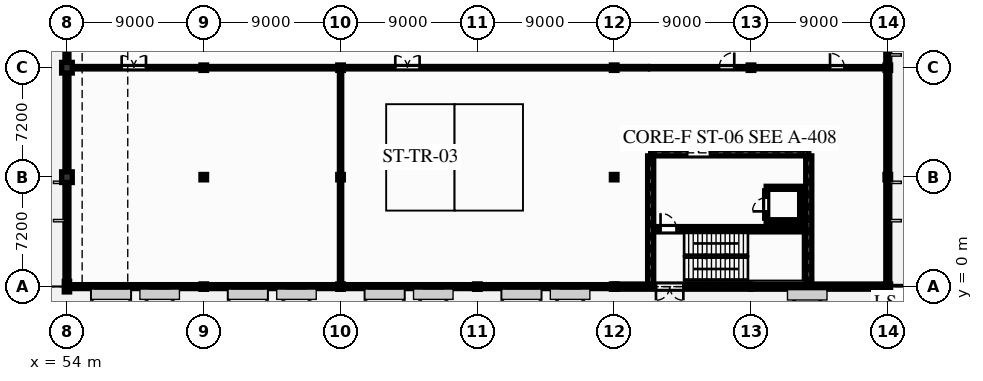
"""IFC4 building model, lengths in metres.
Left out: names, types, materials, properties, quantities, classifications, styles, units other than length and angle.
Written with IfcOpenShell. Run it as: python <this file> out.ifc"""

import sys

from ifc_helpers import new_model, si_unit, direction, frame, frame_2d, origin, origin_2d, place, context, subcontext, project, spatial, rectangle, i_section, extrude, element, fill, save


model = new_model("IFC4")
c1 = context("Model", 3, precision=1e-05, world=origin(), true_north=direction((0.0, 1.0)))
c2 = subcontext(c1, "Body", "Model", "MODEL_VIEW")
j1 = project(units=[si_unit("LENGTHUNIT", "METRE"), si_unit("PLANEANGLEUNIT", "RADIAN")], contexts=[c1])
p1 = place(None, origin())
s1 = spatial("IfcSite", under=j1, at=p1, CompositionType="ELEMENT")
p2 = place(p1, origin())
s2 = spatial("IfcBuilding", under=s1, at=p2, CompositionType="ELEMENT")
p3 = place(p2, origin())
s3 = spatial("IfcBuildingStorey", under=s2, at=p3, CompositionType="ELEMENT", Elevation=0.0)
p4 = place(p3, frame((54.0, 0.0, 0.0), z_axis=(0.0, 0.0, 1.0), x_axis=(0.0, 1.0, 0.0)))
e1 = element("IfcColumn", 1, at=p4, inside=s3, PredefinedType="PILASTER", context=c2, shape_type="SweptSolid", body=[
    extrude(rectangle(XDim=0.35, YDim=0.7, at=origin_2d()), origin(), (0.0, 0.0, 1.0), 5.1),
])
for number, where, z_axis, x_axis in (
    (2, (54.0, 7.2, 0.0), (0.0, 0.0, 1.0), (1.0, 0.0, 0.0)),
    (3, (54.0, 14.4, 0.0), (0.0, 0.0, 1.0), (1.0, 0.0, 0.0)),
):
    element("IfcColumn", number, at=place(p3, frame(where, z_axis=z_axis, x_axis=x_axis)), inside=s3, PredefinedType="COLUMN", context=c2, shape_type="SweptSolid", body=[
        extrude(rectangle(XDim=0.7, YDim=0.7, at=origin_2d()), origin(), (0.0, 0.0, 1.0), 5.1),
    ])
for number, where, z_axis, x_axis in (
    (4, (63.0, 0.0, 0.0), (0.0, 0.0, 1.0), (1.0, 0.0, 0.0)),
    (5, (63.0, 7.2, 0.0), (0.0, 0.0, 1.0), (1.0, 0.0, 0.0)),
    (6, (63.0, 14.4, 0.0), (0.0, 0.0, 1.0), (1.0, 0.0, 0.0)),
    (7, (72.0, 0.0, 0.0), (0.0, 0.0, 1.0), (1.0, 0.0, 0.0)),
    (8, (72.0, 7.2, 0.0), (0.0, 0.0, 1.0), (1.0, 0.0, 0.0)),
    (9, (72.0, 14.4, 0.0), (0.0, 0.0, 1.0), (1.0, 0.0, 0.0)),
    (10, (81.0, 0.0, 0.0), (0.0, 0.0, 1.0), (1.0, 0.0, 0.0)),
    (11, (90.0, 0.0, 0.0), (0.0, 0.0, 1.0), (1.0, 0.0, 0.0)),
    (12, (90.0, 7.2, 0.0), (0.0, 0.0, 1.0), (1.0, 0.0, 0.0)),
    (13, (90.0, 14.4, 0.0), (0.0, 0.0, 1.0), (1.0, 0.0, 0.0)),
    (14, (99.0, 14.4, 0.0), (0.0, 0.0, 1.0), (1.0, 0.0, 0.0)),
    (15, (108.0, 0.0, 0.0), (0.0, 0.0, 1.0), (1.0, 0.0, 0.0)),
    (16, (108.0, 7.2, 0.0), (0.0, 0.0, 1.0), (1.0, 0.0, 0.0)),
    (17, (108.0, 14.4, 0.0), (0.0, 0.0, 1.0), (1.0, 0.0, 0.0)),
):
    element("IfcColumn", number, at=place(p3, frame(where, z_axis=z_axis, x_axis=x_axis)), inside=s3, PredefinedType="COLUMN", context=c2, shape_type="SweptSolid", body=[
        extrude(i_section(OverallWidth=0.368, OverallDepth=0.356, WebThickness=0.011, FlangeThickness=0.018, at=origin_2d()), origin(), (0.0, 0.0, 1.0), 5.1),
    ])
p5 = place(p3, frame((54.0, 0.0, 0.0), z_axis=(0.0, 0.0, 1.0), x_axis=(1.0, 0.0, 0.0)))
e18 = element("IfcWall", 18, at=p5, inside=s3, PredefinedType="SOLIDWALL", context=c2, shape_type="SweptSolid", body=[
    extrude(rectangle(XDim=9.0, YDim=0.26, at=frame_2d((4.5, 0.0))), origin(), (0.0, 0.0, 1.0), 3.45),
])
p6 = place(p5, frame((1.8, 0.0, 0.65)))
e19 = element("IfcOpeningElement", 19, at=p6, cuts=e18, PredefinedType="OPENING", context=c2, shape_type="SweptSolid", body=[
    extrude(rectangle(XDim=2.2, YDim=1.95, at=frame_2d((1.1, 0.975))), frame((0.0, 0.14, 0.0), z_axis=(0.0, -1.0, 0.0), x_axis=(1.0, 0.0, 0.0)), (0.0, 0.0, 1.0), 0.28),
])
p7 = place(p5, frame((5.4, 0.0, 0.65)))
e20 = element("IfcOpeningElement", 20, at=p7, cuts=e18, PredefinedType="OPENING", context=c2, shape_type="SweptSolid", body=[
    extrude(rectangle(XDim=1.4, YDim=1.8, at=frame_2d((0.7, 0.9))), frame((0.0, 0.14, 0.0), z_axis=(0.0, -1.0, 0.0), x_axis=(1.0, 0.0, 0.0)), (0.0, 0.0, 1.0), 0.28),
])
p8 = place(p3, frame((63.0, 0.0, 0.0), z_axis=(0.0, 0.0, 1.0), x_axis=(1.0, 0.0, 0.0)))
e21 = element("IfcWall", 21, at=p8, inside=s3, PredefinedType="SOLIDWALL", context=c2, shape_type="SweptSolid", body=[
    extrude(rectangle(XDim=9.0, YDim=0.26, at=frame_2d((4.5, 0.0))), origin(), (0.0, 0.0, 1.0), 3.45),
])
p9 = place(p8, frame((1.8, 0.0, 0.65)))
e22 = element("IfcOpeningElement", 22, at=p9, cuts=e21, PredefinedType="OPENING", context=c2, shape_type="SweptSolid", body=[
    extrude(rectangle(XDim=2.2, YDim=1.95, at=frame_2d((1.1, 0.975))), frame((0.0, 0.14, 0.0), z_axis=(0.0, -1.0, 0.0), x_axis=(1.0, 0.0, 0.0)), (0.0, 0.0, 1.0), 0.28),
])
p10 = place(p8, frame((5.4, 0.0, 0.65)))
e23 = element("IfcOpeningElement", 23, at=p10, cuts=e21, PredefinedType="OPENING", context=c2, shape_type="SweptSolid", body=[
    extrude(rectangle(XDim=1.4, YDim=1.8, at=frame_2d((0.7, 0.9))), frame((0.0, 0.14, 0.0), z_axis=(0.0, -1.0, 0.0), x_axis=(1.0, 0.0, 0.0)), (0.0, 0.0, 1.0), 0.28),
])
p11 = place(p3, frame((72.0, 0.0, 0.0), z_axis=(0.0, 0.0, 1.0), x_axis=(1.0, 0.0, 0.0)))
e24 = element("IfcWall", 24, at=p11, inside=s3, PredefinedType="SOLIDWALL", context=c2, shape_type="SweptSolid", body=[
    extrude(rectangle(XDim=9.0, YDim=0.26, at=frame_2d((4.5, 0.0))), origin(), (0.0, 0.0, 1.0), 3.45),
])
p12 = place(p11, frame((1.8, 0.0, 0.65)))
e25 = element("IfcOpeningElement", 25, at=p12, cuts=e24, PredefinedType="OPENING", context=c2, shape_type="SweptSolid", body=[
    extrude(rectangle(XDim=2.2, YDim=1.95, at=frame_2d((1.1, 0.975))), frame((0.0, 0.14, 0.0), z_axis=(0.0, -1.0, 0.0), x_axis=(1.0, 0.0, 0.0)), (0.0, 0.0, 1.0), 0.28),
])
p13 = place(p11, frame((5.4, 0.0, 0.65)))
e26 = element("IfcOpeningElement", 26, at=p13, cuts=e24, PredefinedType="OPENING", context=c2, shape_type="SweptSolid", body=[
    extrude(rectangle(XDim=1.4, YDim=1.8, at=frame_2d((0.7, 0.9))), frame((0.0, 0.14, 0.0), z_axis=(0.0, -1.0, 0.0), x_axis=(1.0, 0.0, 0.0)), (0.0, 0.0, 1.0), 0.28),
])
p14 = place(p3, frame((81.0, 0.0, 0.0), z_axis=(0.0, 0.0, 1.0), x_axis=(1.0, 0.0, 0.0)))
e27 = element("IfcWall", 27, at=p14, inside=s3, PredefinedType="SOLIDWALL", context=c2, shape_type="SweptSolid", body=[
    extrude(rectangle(XDim=9.0, YDim=0.26, at=frame_2d((4.5, 0.0))), origin(), (0.0, 0.0, 1.0), 3.45),
])
p15 = place(p14, frame((1.8, 0.0, 0.65)))
e28 = element("IfcOpeningElement", 28, at=p15, cuts=e27, PredefinedType="OPENING", context=c2, shape_type="SweptSolid", body=[
    extrude(rectangle(XDim=2.2, YDim=1.95, at=frame_2d((1.1, 0.975))), frame((0.0, 0.14, 0.0), z_axis=(0.0, -1.0, 0.0), x_axis=(1.0, 0.0, 0.0)), (0.0, 0.0, 1.0), 0.28),
])
p16 = place(p14, frame((5.4, 0.0, 0.65)))
e29 = element("IfcOpeningElement", 29, at=p16, cuts=e27, PredefinedType="OPENING", context=c2, shape_type="SweptSolid", body=[
    extrude(rectangle(XDim=1.4, YDim=1.8, at=frame_2d((0.7, 0.9))), frame((0.0, 0.14, 0.0), z_axis=(0.0, -1.0, 0.0), x_axis=(1.0, 0.0, 0.0)), (0.0, 0.0, 1.0), 0.28),
])
p17 = place(p3, frame((90.0, 0.0, 0.0), z_axis=(0.0, 0.0, 1.0), x_axis=(1.0, 0.0, 0.0)))
e30 = element("IfcWall", 30, at=p17, inside=s3, PredefinedType="SOLIDWALL", context=c2, shape_type="SweptSolid", body=[
    extrude(rectangle(XDim=9.0, YDim=0.34, at=frame_2d((4.5, 0.0))), origin(), (0.0, 0.0, 1.0), 4.8),
])
p18 = place(p17, frame((2.75, 0.0, 0.0)))
e31 = element("IfcOpeningElement", 31, at=p18, cuts=e30, PredefinedType="OPENING", context=c2, shape_type="SweptSolid", body=[
    extrude(rectangle(XDim=1.8, YDim=2.4, at=frame_2d((0.9, 1.2))), frame((0.0, 0.18, 0.0), z_axis=(0.0, -1.0, 0.0), x_axis=(1.0, 0.0, 0.0)), (0.0, 0.0, 1.0), 0.36),
])
p19 = place(p3, frame((99.0, 0.0, 0.0), z_axis=(0.0, 0.0, 1.0), x_axis=(1.0, 0.0, 0.0)))
e32 = element("IfcWall", 32, at=p19, inside=s3, PredefinedType="SOLIDWALL", context=c2, shape_type="SweptSolid", body=[
    extrude(rectangle(XDim=9.0, YDim=0.34, at=frame_2d((4.5, 0.0))), origin(), (0.0, 0.0, 1.0), 4.8),
])
p20 = place(p19, frame((5.2, 0.0, 0.85)))
e33 = element("IfcOpeningElement", 33, at=p20, cuts=e32, PredefinedType="OPENING", context=c2, shape_type="SweptSolid", body=[
    extrude(rectangle(XDim=1.4, YDim=1.8, at=frame_2d((0.7, 0.9))), frame((0.0, 0.18, 0.0), z_axis=(0.0, -1.0, 0.0), x_axis=(1.0, 0.0, 0.0)), (0.0, 0.0, 1.0), 0.36),
])
p21 = place(p3, frame((54.0, 0.0, 0.0), z_axis=(0.0, 0.0, 1.0), x_axis=(0.0, 1.0, 0.0)))
e34 = element("IfcWall", 34, at=p21, inside=s3, PredefinedType="SOLIDWALL", context=c2, shape_type="SweptSolid", body=[
    extrude(rectangle(XDim=21.6, YDim=0.26, at=frame_2d((10.8, 0.0))), origin(), (0.0, 0.0, 1.0), 3.955),
])
p22 = place(p21, frame((4.5, 0.0, 0.85)))
e35 = element("IfcOpeningElement", 35, at=p22, cuts=e34, PredefinedType="OPENING", context=c2, shape_type="SweptSolid", body=[
    extrude(rectangle(XDim=2.2, YDim=1.95, at=frame_2d((1.1, 0.975))), frame((0.0, 0.14, 0.0), z_axis=(0.0, -1.0, 0.0), x_axis=(1.0, 0.0, 0.0)), (0.0, 0.0, 1.0), 0.28),
])
p23 = place(p21, frame((15.85, 0.0, 0.85)))
e36 = element("IfcOpeningElement", 36, at=p23, cuts=e34, PredefinedType="OPENING", context=c2, shape_type="SweptSolid", body=[
    extrude(rectangle(XDim=1.85, YDim=1.75, at=frame_2d((0.925, 0.875))), frame((0.0, 0.14, 0.0), z_axis=(0.0, -1.0, 0.0), x_axis=(1.0, 0.0, 0.0)), (0.0, 0.0, 1.0), 0.28),
])
p24 = place(p3, frame((108.0, 0.0, 0.0), z_axis=(0.0, 0.0, 1.0), x_axis=(0.0, 1.0, 0.0)))
e37 = element("IfcWall", 37, at=p24, inside=s3, PredefinedType="SOLIDWALL", context=c2, shape_type="SweptSolid", body=[
    extrude(rectangle(XDim=21.6, YDim=0.26, at=frame_2d((10.8, 0.0))), origin(), (0.0, 0.0, 1.0), 4.363),
])
p25 = place(p24, frame((4.5, 0.0, 0.85)))
e38 = element("IfcOpeningElement", 38, at=p25, cuts=e37, PredefinedType="OPENING", context=c2, shape_type="SweptSolid", body=[
    extrude(rectangle(XDim=2.2, YDim=1.95, at=frame_2d((1.1, 0.975))), frame((0.0, 0.14, 0.0), z_axis=(0.0, -1.0, 0.0), x_axis=(1.0, 0.0, 0.0)), (0.0, 0.0, 1.0), 0.28),
])
p26 = place(p24, frame((15.4, 0.0, 0.85)))
e39 = element("IfcOpeningElement", 39, at=p26, cuts=e37, PredefinedType="OPENING", context=c2, shape_type="SweptSolid", body=[
    extrude(rectangle(XDim=1.4, YDim=1.8, at=frame_2d((0.7, 0.9))), frame((0.0, 0.14, 0.0), z_axis=(0.0, -1.0, 0.0), x_axis=(1.0, 0.0, 0.0)), (0.0, 0.0, 1.0), 0.28),
])
p27 = place(p3, frame((92.4, 8.8, 0.0), z_axis=(0.0, 0.0, 1.0), x_axis=(1.0, 0.0, 0.0)))
e40 = element("IfcWall", 40, at=p27, inside=s3, PredefinedType="SHEAR", context=c2, shape_type="SweptSolid", body=[
    extrude(rectangle(XDim=10.4, YDim=0.4, at=frame_2d((5.2, 0.0))), origin(), (0.0, 0.0, 1.0), 4.8),
])
p28 = place(p27, frame((2.4, 0.0, 0.0)))
e41 = element("IfcOpeningElement", 41, at=p28, cuts=e40, PredefinedType="OPENING", context=c2, shape_type="SweptSolid", body=[
    extrude(rectangle(XDim=1.5, YDim=2.2, at=frame_2d((0.75, 1.1))), frame((0.0, 0.21, 0.0), z_axis=(0.0, -1.0, 0.0), x_axis=(1.0, 0.0, 0.0)), (0.0, 0.0, 1.0), 0.42),
])
for number, where, z_axis, x_axis in (
    (42, (92.4, 0.17, 0.0), (0.0, 0.0, 1.0), (0.0, 1.0, 0.0)),
    (43, (102.8, 0.17, 0.0), (0.0, 0.0, 1.0), (0.0, 1.0, 0.0)),
):
    element("IfcWall", number, at=place(p3, frame(where, z_axis=z_axis, x_axis=x_axis)), inside=s3, PredefinedType="SHEAR", context=c2, shape_type="SweptSolid", body=[
        extrude(rectangle(XDim=8.43, YDim=0.4, at=frame_2d((4.215, 0.0))), origin(), (0.0, 0.0, 1.0), 4.8),
    ])
p29 = place(p3, frame((92.6, 3.775, 0.0), z_axis=(0.0, 0.0, 1.0), x_axis=(1.0, 0.0, 0.0)))
e44 = element("IfcWall", 44, at=p29, inside=s3, PredefinedType="SHEAR", context=c2, shape_type="SweptSolid", body=[
    extrude(rectangle(XDim=10.0, YDim=0.35, at=frame_2d((5.0, 0.0))), origin(), (0.0, 0.0, 1.0), 4.8),
])
p30 = place(p29, frame((0.45, 0.0, 0.0)))
e45 = element("IfcOpeningElement", 45, at=p30, cuts=e44, PredefinedType="OPENING", context=c2, shape_type="SweptSolid", body=[
    extrude(rectangle(XDim=1.05, YDim=2.2, at=frame_2d((0.525, 1.1))), frame((0.0, 0.185, 0.0), z_axis=(0.0, -1.0, 0.0), x_axis=(1.0, 0.0, 0.0)), (0.0, 0.0, 1.0), 0.37),
])
for number, where, z_axis, x_axis in (
    (46, (100.0, 4.3, 0.0), (0.0, 0.0, 1.0), (1.0, 0.0, 0.0)),
    (47, (100.0, 6.5, 0.0), (0.0, 0.0, 1.0), (1.0, 0.0, 0.0)),
):
    element("IfcWall", number, at=place(p3, frame(where, z_axis=z_axis, x_axis=x_axis)), inside=s3, PredefinedType="PARTITIONING", context=c2, shape_type="SweptSolid", body=[
        extrude(rectangle(XDim=2.3, YDim=0.2, at=frame_2d((1.15, 0.0))), origin(), (0.0, 0.0, 1.0), 4.8),
    ])
p31 = place(p3, frame((100.0, 4.5, 0.0), z_axis=(0.0, 0.0, 1.0), x_axis=(0.0, 1.0, 0.0)))
e48 = element("IfcWall", 48, at=p31, inside=s3, PredefinedType="PARTITIONING", context=c2, shape_type="SweptSolid", body=[
    extrude(rectangle(XDim=1.8, YDim=0.2, at=frame_2d((0.9, 0.0))), origin(), (0.0, 0.0, 1.0), 4.8),
])
p32 = place(p31, frame((0.45, 0.0, 0.0)))
e49 = element("IfcOpeningElement", 49, at=p32, cuts=e48, PredefinedType="OPENING", context=c2, shape_type="SweptSolid", body=[
    extrude(rectangle(XDim=0.9, YDim=2.1, at=frame_2d((0.45, 1.05))), frame((0.0, 0.11, 0.0), z_axis=(0.0, -1.0, 0.0), x_axis=(1.0, 0.0, 0.0)), (0.0, 0.0, 1.0), 0.22),
])
p33 = place(p3, frame((102.3, 4.5, 0.0), z_axis=(0.0, 0.0, 1.0), x_axis=(0.0, 1.0, 0.0)))
e50 = element("IfcWall", 50, at=p33, inside=s3, PredefinedType="PARTITIONING", context=c2, shape_type="SweptSolid", body=[
    extrude(rectangle(XDim=1.8, YDim=0.2, at=frame_2d((0.9, 0.0))), origin(), (0.0, 0.0, 1.0), 4.8),
])
p34 = place(p3, frame((54.0, 14.4, 0.0), z_axis=(0.0, 0.0, 1.0), x_axis=(1.0, 0.0, 0.0)))
e51 = element("IfcWall", 51, at=p34, inside=s3, PredefinedType="PARTITIONING", context=c2, shape_type="SweptSolid", body=[
    extrude(rectangle(XDim=38.2, YDim=0.16, at=frame_2d((19.1, 0.0))), origin(), (0.0, 0.0, 1.0), 3.898),
])
p35 = place(p34, frame((3.6, 0.0, 0.0)))
e52 = element("IfcOpeningElement", 52, at=p35, cuts=e51, PredefinedType="OPENING", context=c2, shape_type="SweptSolid", body=[
    extrude(rectangle(XDim=1.6, YDim=2.2, at=frame_2d((0.8, 1.1))), frame((0.0, 0.09, 0.0), z_axis=(0.0, -1.0, 0.0), x_axis=(1.0, 0.0, 0.0)), (0.0, 0.0, 1.0), 0.18),
])
p36 = place(p34, frame((21.6, 0.0, 0.0)))
e53 = element("IfcOpeningElement", 53, at=p36, cuts=e51, PredefinedType="OPENING", context=c2, shape_type="SweptSolid", body=[
    extrude(rectangle(XDim=1.6, YDim=2.2, at=frame_2d((0.8, 1.1))), frame((0.0, 0.09, 0.0), z_axis=(0.0, -1.0, 0.0), x_axis=(1.0, 0.0, 0.0)), (0.0, 0.0, 1.0), 0.18),
])
p37 = place(p3, frame((72.0, 0.0, 0.0), z_axis=(0.0, 0.0, 1.0), x_axis=(0.0, 1.0, 0.0)))
e54 = element("IfcWall", 54, at=p37, inside=s3, PredefinedType="PARTITIONING", context=c2, shape_type="SweptSolid", body=[
    extrude(rectangle(XDim=14.4, YDim=0.15, at=frame_2d((7.2, 0.0))), origin(), (0.0, 0.0, 1.0), 4.363),
])
p38 = place(p3, frame((92.4, 14.4, 0.0), z_axis=(0.0, 0.0, 1.0), x_axis=(1.0, 0.0, 0.0)))
e55 = element("IfcWall", 55, at=p38, inside=s3, PredefinedType="PARTITIONING", context=c2, shape_type="SweptSolid", body=[
    extrude(rectangle(XDim=15.6, YDim=0.15, at=frame_2d((7.8, 0.0))), origin(), (0.0, 0.0, 1.0), 4.208),
])
p39 = place(p38, frame((4.5, 0.0, 0.0)))
e56 = element("IfcOpeningElement", 56, at=p39, cuts=e55, PredefinedType="OPENING", context=c2, shape_type="SweptSolid", body=[
    extrude(rectangle(XDim=1.0, YDim=2.15, at=frame_2d((0.5, 1.075))), frame((0.0, 0.085, 0.0), z_axis=(0.0, -1.0, 0.0), x_axis=(1.0, 0.0, 0.0)), (0.0, 0.0, 1.0), 0.17),
])
p40 = place(p38, frame((11.8, 0.0, 0.0)))
e57 = element("IfcOpeningElement", 57, at=p40, cuts=e55, PredefinedType="OPENING", context=c2, shape_type="SweptSolid", body=[
    extrude(rectangle(XDim=0.95, YDim=2.15, at=frame_2d((0.475, 1.075))), frame((0.0, 0.085, 0.0), z_axis=(0.0, -1.0, 0.0), x_axis=(1.0, 0.0, 0.0)), (0.0, 0.0, 1.0), 0.17),
])
p41 = place(p6, origin())
e58 = element("IfcWindow", 58, at=p41, inside=s3, PartitioningType="SINGLE_PANEL", PredefinedType="WINDOW", context=c2, shape_type="SweptSolid", body=[
    extrude(rectangle(XDim=2.2, YDim=1.95, at=frame_2d((1.1, 0.975))), frame((0.0, 0.03, 0.0), z_axis=(0.0, -1.0, 0.0), x_axis=(1.0, 0.0, 0.0)), (0.0, 0.0, 1.0), 0.06),
])
fill(e19, e58)
p42 = place(p7, origin())
e59 = element("IfcWindow", 59, at=p42, inside=s3, PartitioningType="SINGLE_PANEL", PredefinedType="WINDOW", context=c2, shape_type="SweptSolid", body=[
    extrude(rectangle(XDim=1.4, YDim=1.8, at=frame_2d((0.7, 0.9))), frame((0.0, 0.03, 0.0), z_axis=(0.0, -1.0, 0.0), x_axis=(1.0, 0.0, 0.0)), (0.0, 0.0, 1.0), 0.06),
])
fill(e20, e59)
p43 = place(p9, origin())
e60 = element("IfcWindow", 60, at=p43, inside=s3, PartitioningType="SINGLE_PANEL", PredefinedType="WINDOW", context=c2, shape_type="SweptSolid", body=[
    extrude(rectangle(XDim=2.2, YDim=1.95, at=frame_2d((1.1, 0.975))), frame((0.0, 0.03, 0.0), z_axis=(0.0, -1.0, 0.0), x_axis=(1.0, 0.0, 0.0)), (0.0, 0.0, 1.0), 0.06),
])
fill(e22, e60)
p44 = place(p10, origin())
e61 = element("IfcWindow", 61, at=p44, inside=s3, PartitioningType="SINGLE_PANEL", PredefinedType="WINDOW", context=c2, shape_type="SweptSolid", body=[
    extrude(rectangle(XDim=1.4, YDim=1.8, at=frame_2d((0.7, 0.9))), frame((0.0, 0.03, 0.0), z_axis=(0.0, -1.0, 0.0), x_axis=(1.0, 0.0, 0.0)), (0.0, 0.0, 1.0), 0.06),
])
fill(e23, e61)
p45 = place(p12, origin())
e62 = element("IfcWindow", 62, at=p45, inside=s3, PartitioningType="SINGLE_PANEL", PredefinedType="WINDOW", context=c2, shape_type="SweptSolid", body=[
    extrude(rectangle(XDim=2.2, YDim=1.95, at=frame_2d((1.1, 0.975))), frame((0.0, 0.03, 0.0), z_axis=(0.0, -1.0, 0.0), x_axis=(1.0, 0.0, 0.0)), (0.0, 0.0, 1.0), 0.06),
])
fill(e25, e62)
p46 = place(p13, origin())
e63 = element("IfcWindow", 63, at=p46, inside=s3, PartitioningType="SINGLE_PANEL", PredefinedType="WINDOW", context=c2, shape_type="SweptSolid", body=[
    extrude(rectangle(XDim=1.4, YDim=1.8, at=frame_2d((0.7, 0.9))), frame((0.0, 0.03, 0.0), z_axis=(0.0, -1.0, 0.0), x_axis=(1.0, 0.0, 0.0)), (0.0, 0.0, 1.0), 0.06),
])
fill(e26, e63)
p47 = place(p15, origin())
e64 = element("IfcWindow", 64, at=p47, inside=s3, PartitioningType="SINGLE_PANEL", PredefinedType="WINDOW", context=c2, shape_type="SweptSolid", body=[
    extrude(rectangle(XDim=2.2, YDim=1.95, at=frame_2d((1.1, 0.975))), frame((0.0, 0.03, 0.0), z_axis=(0.0, -1.0, 0.0), x_axis=(1.0, 0.0, 0.0)), (0.0, 0.0, 1.0), 0.06),
])
fill(e28, e64)
p48 = place(p16, origin())
e65 = element("IfcWindow", 65, at=p48, inside=s3, PartitioningType="SINGLE_PANEL", PredefinedType="WINDOW", context=c2, shape_type="SweptSolid", body=[
    extrude(rectangle(XDim=1.4, YDim=1.8, at=frame_2d((0.7, 0.9))), frame((0.0, 0.03, 0.0), z_axis=(0.0, -1.0, 0.0), x_axis=(1.0, 0.0, 0.0)), (0.0, 0.0, 1.0), 0.06),
])
fill(e29, e65)
p49 = place(p18, frame((1.8, 0.0, 0.0), z_axis=(0.0, 0.0, 1.0), x_axis=(-1.0, 0.0, 0.0)))
e66 = element("IfcDoor", 66, at=p49, inside=s3, OperationType="DOUBLE_DOOR_SINGLE_SWING", PredefinedType="DOOR", context=c2, shape_type="SweptSolid", body=[
    extrude(rectangle(XDim=1.8, YDim=2.4, at=frame_2d((0.9, 1.2))), frame((0.0, 0.025, 0.0), z_axis=(0.0, -1.0, 0.0), x_axis=(1.0, 0.0, 0.0)), (0.0, 0.0, 1.0), 0.05),
])
fill(e31, e66)
p50 = place(p20, origin())
e67 = element("IfcWindow", 67, at=p50, inside=s3, PartitioningType="SINGLE_PANEL", PredefinedType="WINDOW", context=c2, shape_type="SweptSolid", body=[
    extrude(rectangle(XDim=1.4, YDim=1.8, at=frame_2d((0.7, 0.9))), frame((0.0, 0.03, 0.0), z_axis=(0.0, -1.0, 0.0), x_axis=(1.0, 0.0, 0.0)), (0.0, 0.0, 1.0), 0.06),
])
fill(e33, e67)
p51 = place(p22, origin())
e68 = element("IfcWindow", 68, at=p51, inside=s3, PartitioningType="SINGLE_PANEL", PredefinedType="WINDOW", context=c2, shape_type="SweptSolid", body=[
    extrude(rectangle(XDim=2.2, YDim=1.95, at=frame_2d((1.1, 0.975))), frame((0.0, 0.03, 0.0), z_axis=(0.0, -1.0, 0.0), x_axis=(1.0, 0.0, 0.0)), (0.0, 0.0, 1.0), 0.06),
])
fill(e35, e68)
p52 = place(p25, origin())
e69 = element("IfcWindow", 69, at=p52, inside=s3, PartitioningType="SINGLE_PANEL", PredefinedType="WINDOW", context=c2, shape_type="SweptSolid", body=[
    extrude(rectangle(XDim=2.2, YDim=1.95, at=frame_2d((1.1, 0.975))), frame((0.0, 0.03, 0.0), z_axis=(0.0, -1.0, 0.0), x_axis=(1.0, 0.0, 0.0)), (0.0, 0.0, 1.0), 0.06),
])
fill(e38, e69)
p53 = place(p28, origin())
e70 = element("IfcDoor", 70, at=p53, inside=s3, OperationType="DOUBLE_DOOR_SINGLE_SWING", PredefinedType="DOOR", context=c2, shape_type="SweptSolid", body=[
    extrude(rectangle(XDim=1.5, YDim=2.2, at=frame_2d((0.75, 1.1))), frame((0.0, 0.025, 0.0), z_axis=(0.0, -1.0, 0.0), x_axis=(1.0, 0.0, 0.0)), (0.0, 0.0, 1.0), 0.05),
])
fill(e41, e70)
p54 = place(p30, origin())
e71 = element("IfcDoor", 71, at=p54, inside=s3, OperationType="SINGLE_SWING_LEFT", PredefinedType="DOOR", context=c2, shape_type="SweptSolid", body=[
    extrude(rectangle(XDim=1.05, YDim=2.2, at=frame_2d((0.525, 1.1))), frame((0.0, 0.025, 0.0), z_axis=(0.0, -1.0, 0.0), x_axis=(1.0, 0.0, 0.0)), (0.0, 0.0, 1.0), 0.05),
])
fill(e45, e71)
p55 = place(p32, origin())
e72 = element("IfcDoor", 72, at=p55, inside=s3, OperationType="SINGLE_SWING_LEFT", PredefinedType="DOOR", context=c2, shape_type="SweptSolid", body=[
    extrude(rectangle(XDim=0.9, YDim=2.1, at=frame_2d((0.45, 1.05))), frame((0.0, 0.025, 0.0), z_axis=(0.0, -1.0, 0.0), x_axis=(1.0, 0.0, 0.0)), (0.0, 0.0, 1.0), 0.05),
])
fill(e49, e72)
p56 = place(p35, origin())
e73 = element("IfcDoor", 73, at=p56, inside=s3, OperationType="DOUBLE_DOOR_SINGLE_SWING", PredefinedType="DOOR", context=c2, shape_type="SweptSolid", body=[
    extrude(rectangle(XDim=1.6, YDim=2.2, at=frame_2d((0.8, 1.1))), frame((0.0, 0.025, 0.0), z_axis=(0.0, -1.0, 0.0), x_axis=(1.0, 0.0, 0.0)), (0.0, 0.0, 1.0), 0.05),
])
fill(e52, e73)
p57 = place(p36, origin())
e74 = element("IfcDoor", 74, at=p57, inside=s3, OperationType="DOUBLE_DOOR_SINGLE_SWING", PredefinedType="DOOR", context=c2, shape_type="SweptSolid", body=[
    extrude(rectangle(XDim=1.6, YDim=2.2, at=frame_2d((0.8, 1.1))), frame((0.0, 0.025, 0.0), z_axis=(0.0, -1.0, 0.0), x_axis=(1.0, 0.0, 0.0)), (0.0, 0.0, 1.0), 0.05),
])
fill(e53, e74)
p58 = place(p39, origin())
e75 = element("IfcDoor", 75, at=p58, inside=s3, OperationType="SINGLE_SWING_RIGHT", PredefinedType="DOOR", context=c2, shape_type="SweptSolid", body=[
    extrude(rectangle(XDim=1.0, YDim=2.15, at=frame_2d((0.5, 1.075))), frame((0.0, 0.025, 0.0), z_axis=(0.0, -1.0, 0.0), x_axis=(1.0, 0.0, 0.0)), (0.0, 0.0, 1.0), 0.05),
])
fill(e56, e75)
p59 = place(p40, origin())
e76 = element("IfcDoor", 76, at=p59, inside=s3, OperationType="SINGLE_SWING_LEFT", PredefinedType="DOOR", context=c2, shape_type="SweptSolid", body=[
    extrude(rectangle(XDim=0.95, YDim=2.15, at=frame_2d((0.475, 1.075))), frame((0.0, 0.025, 0.0), z_axis=(0.0, -1.0, 0.0), x_axis=(1.0, 0.0, 0.0)), (0.0, 0.0, 1.0), 0.05),
])
fill(e57, e76)
save(model, sys.argv[1])
